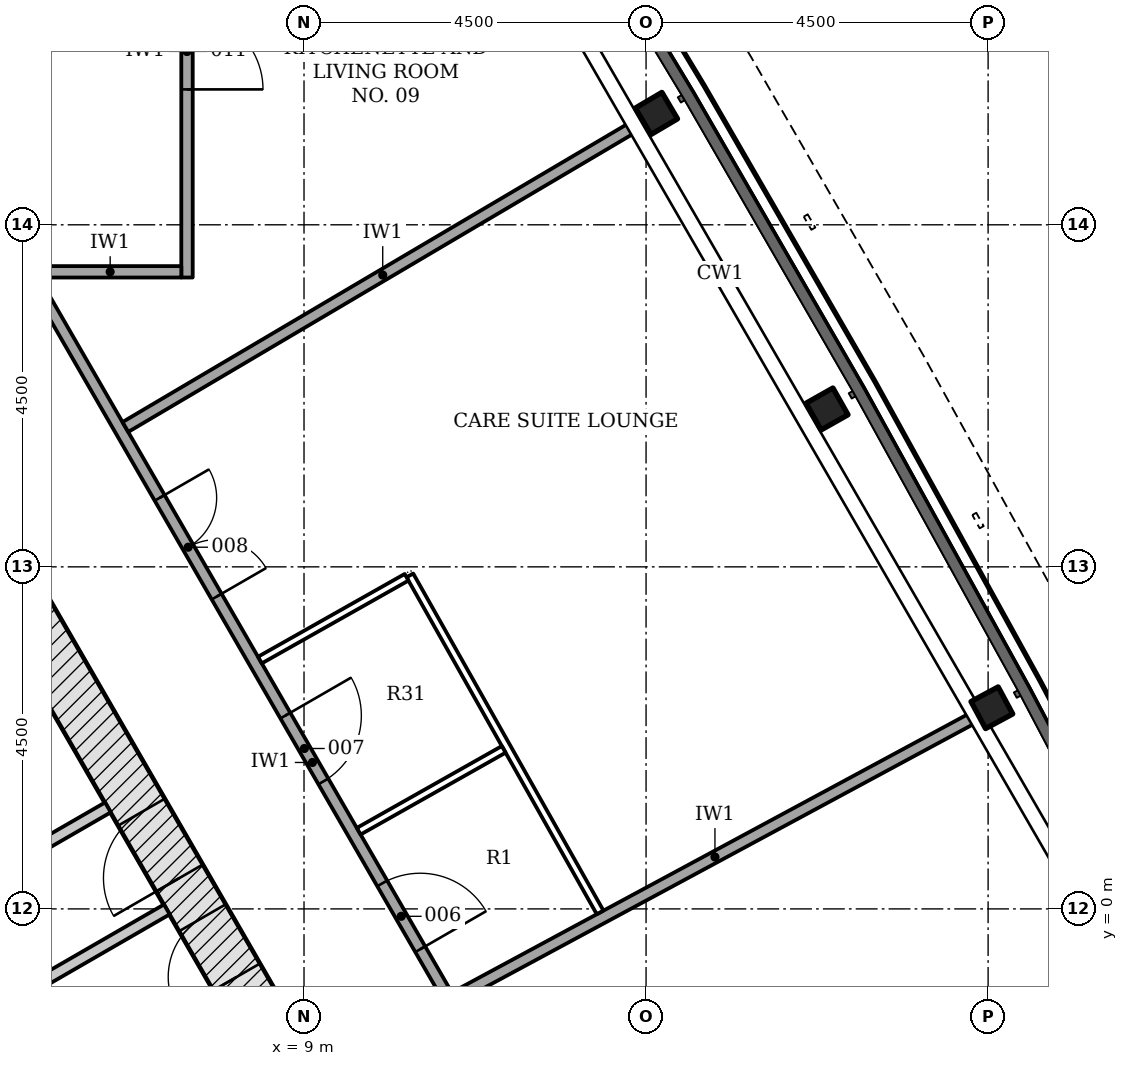
"""IFC4 building model, lengths in metres.
Left out: names, types, materials, properties, quantities, classifications, styles, units other than length and angle.
Written with IfcOpenShell. Run it as: python <this file> out.ifc"""

import sys

from ifc_helpers import new_model, si_unit, direction, frame, frame_2d, origin, origin_2d, place, context, subcontext, project, spatial, rectangle, i_section, extrude, element, fill, save


model = new_model("IFC4")
c1 = context("Model", 3, precision=1e-05, world=origin(), true_north=direction((0.0, 1.0)))
c2 = subcontext(c1, "Body", "Model", "MODEL_VIEW")
j1 = project(units=[si_unit("LENGTHUNIT", "METRE"), si_unit("PLANEANGLEUNIT", "RADIAN")], contexts=[c1])
p1 = place(None, origin())
s1 = spatial("IfcSite", under=j1, at=p1, CompositionType="ELEMENT")
p2 = place(p1, origin())
s2 = spatial("IfcBuilding", under=s1, at=p2, CompositionType="ELEMENT")
p3 = place(p2, frame((0.0, 0.0, 79.8)))
s3 = spatial("IfcBuildingStorey", under=s2, at=p3, CompositionType="ELEMENT", Elevation=79.8)
p4 = place(p3, frame((10.311, -4.703, -0.2), z_axis=(0.0, 0.0, 1.0), x_axis=(-0.500001446645, 0.866024568562, 0.0)))
e1 = element("IfcWall", 1, at=p4, inside=s3, PredefinedType="SHEAR", context=c2, shape_type="SweptSolid", body=[
    extrude(rectangle(XDim=18.458, YDim=0.7, at=frame_2d((9.229, 0.0))), origin(), (0.0, 0.0, 1.0), 3.6),
])
p5 = place(p4, frame((5.9, 0.0, 0.2)))
e2 = element("IfcOpeningElement", 2, at=p5, cuts=e1, PredefinedType="OPENING", context=c2, shape_type="SweptSolid", body=[
    extrude(rectangle(XDim=1.0, YDim=2.1, at=frame_2d((0.5, 1.05))), frame((0.0, 0.36, 0.0), z_axis=(0.0, -1.0, 0.0), x_axis=(1.0, 0.0, 0.0)), (0.0, 0.0, 1.0), 0.72),
])
p6 = place(p4, frame((1.452, 0.0, 0.2)))
e3 = element("IfcOpeningElement", 3, at=p6, cuts=e1, PredefinedType="OPENING", context=c2, shape_type="SweptSolid", body=[
    extrude(rectangle(XDim=0.9, YDim=2.1, at=frame_2d((0.45, 1.05))), frame((0.0, 0.36, 0.0), z_axis=(0.0, -1.0, 0.0), x_axis=(1.0, 0.0, 0.0)), (0.0, 0.0, 1.0), 0.72),
])
p7 = place(p4, frame((4.396, 0.0, 0.2)))
e4 = element("IfcOpeningElement", 4, at=p7, cuts=e1, PredefinedType="OPENING", context=c2, shape_type="SweptSolid", body=[
    extrude(rectangle(XDim=0.9, YDim=2.1, at=frame_2d((0.45, 1.05))), frame((0.0, 0.36, 0.0), z_axis=(0.0, -1.0, 0.0), x_axis=(1.0, 0.0, 0.0)), (0.0, 0.0, 1.0), 0.72),
])
p8 = place(p4, frame((13.023, 0.0, 0.2)))
e5 = element("IfcOpeningElement", 5, at=p8, cuts=e1, PredefinedType="OPENING", context=c2, shape_type="SweptSolid", body=[
    extrude(rectangle(XDim=0.9, YDim=2.1, at=frame_2d((0.45, 1.05))), frame((0.0, 0.36, 0.0), z_axis=(0.0, -1.0, 0.0), x_axis=(1.0, 0.0, 0.0)), (0.0, 0.0, 1.0), 0.72),
])
for number, where, z_axis, x_axis in (
    (6, (18.05, 2.646, -0.2), (0.0, 0.0, 1.0), (-0.474, 0.88, 0.0)),
    (7, (15.881, 6.577, -0.2), (0.0, 0.0, 1.0), (-0.492, 0.871, 0.0)),
    (8, (13.636, 10.465, -0.2), (0.0, 0.0, 1.0), (-0.508, 0.861, 0.0)),
):
    element("IfcColumn", number, at=place(p3, frame(where, z_axis=z_axis, x_axis=x_axis)), inside=s3, PredefinedType="COLUMN", context=c2, shape_type="SweptSolid", body=[
        extrude(i_section(OverallWidth=0.404, OverallDepth=0.406, WebThickness=0.027, FlangeThickness=0.044, FilletRadius=0.015, at=origin_2d()), origin(), (0.0, 0.0, 1.0), 3.6),
    ])
p9 = place(p3, frame((-1.804, -3.413, 0.0), z_axis=(0.0, 0.0, 1.0), x_axis=(0.866035761792, 0.499982058975, 0.0)))
e9 = element("IfcWall", 9, at=p9, inside=s3, PredefinedType="PARTITIONING", context=c2, shape_type="SweptSolid", body=[
    extrude(rectangle(XDim=9.497, YDim=0.15, at=frame_2d((4.749, 0.0))), origin(), (0.0, 0.0, 1.0), 3.4),
])
p10 = place(p9, frame((2.85, 0.0, 0.0)))
e10 = element("IfcOpeningElement", 10, at=p10, cuts=e9, PredefinedType="OPENING", context=c2, shape_type="SweptSolid", body=[
    extrude(rectangle(XDim=0.9, YDim=2.1, at=frame_2d((0.45, 1.05))), frame((0.0, 0.085, 0.0), z_axis=(0.0, -1.0, 0.0), x_axis=(1.0, 0.0, 0.0)), (0.0, 0.0, 1.0), 0.17),
])
p11 = place(p3, frame((1.296, -3.413, 0.0), z_axis=(0.0, 0.0, 1.0), x_axis=(0.866029230515, 0.49999337185, 0.0)))
e11 = element("IfcWall", 11, at=p11, inside=s3, PredefinedType="PARTITIONING", context=c2, shape_type="SweptSolid", body=[
    extrude(rectangle(XDim=6.812, YDim=0.15, at=frame_2d((3.406, 0.0))), origin(), (0.0, 0.0, 1.0), 3.4),
])
p12 = place(p11, frame((1.507, 0.0, 0.0)))
e12 = element("IfcOpeningElement", 12, at=p12, cuts=e11, PredefinedType="OPENING", context=c2, shape_type="SweptSolid", body=[
    extrude(rectangle(XDim=0.9, YDim=2.1, at=frame_2d((0.45, 1.05))), frame((0.0, 0.085, 0.0), z_axis=(0.0, -1.0, 0.0), x_axis=(1.0, 0.0, 0.0)), (0.0, 0.0, 1.0), 0.17),
])
p13 = place(p3, frame((5.346, 8.446, 0.0), z_axis=(0.0, 0.0, 1.0), x_axis=(0.500008781656, -0.866020333634, 0.0)))
e13 = element("IfcWall", 13, at=p13, inside=s3, PredefinedType="PARTITIONING", context=c2, shape_type="SweptSolid", body=[
    extrude(rectangle(XDim=15.057, YDim=0.15, at=frame_2d((7.528, 0.0))), origin(), (0.0, 0.0, 1.0), 2.778),
])
p14 = place(p13, frame((12.552, 0.0, 0.0)))
e14 = element("IfcOpeningElement", 14, at=p14, cuts=e13, PredefinedType="OPENING", context=c2, shape_type="SweptSolid", body=[
    extrude(rectangle(XDim=1.0, YDim=2.1, at=frame_2d((0.5, 1.05))), frame((0.0, 0.085, 0.0), z_axis=(0.0, -1.0, 0.0), x_axis=(1.0, 0.0, 0.0)), (0.0, 0.0, 1.0), 0.17),
])
p15 = place(p13, frame((9.365, 0.0, 0.0)))
e15 = element("IfcOpeningElement", 15, at=p15, cuts=e13, PredefinedType="OPENING", context=c2, shape_type="SweptSolid", body=[
    extrude(rectangle(XDim=1.0, YDim=2.1, at=frame_2d((0.5, 1.05))), frame((0.0, 0.085, 0.0), z_axis=(0.0, -1.0, 0.0), x_axis=(1.0, 0.0, 0.0)), (0.0, 0.0, 1.0), 0.17),
])
p16 = place(p13, frame((6.816, 0.0, 0.0)))
e16 = element("IfcOpeningElement", 16, at=p16, cuts=e13, PredefinedType="OPENING", context=c2, shape_type="SweptSolid", body=[
    extrude(rectangle(XDim=1.0, YDim=2.1, at=frame_2d((0.5, 1.05))), frame((0.0, 0.085, 0.0), z_axis=(0.0, -1.0, 0.0), x_axis=(1.0, 0.0, 0.0)), (0.0, 0.0, 1.0), 0.17),
])
p17 = place(p13, frame((3.509, 0.0, 0.0)))
e17 = element("IfcOpeningElement", 17, at=p17, cuts=e13, PredefinedType="OPENING", context=c2, shape_type="SweptSolid", body=[
    extrude(rectangle(XDim=1.5, YDim=2.1, at=frame_2d((0.75, 1.05))), frame((0.0, 0.085, 0.0), z_axis=(0.0, -1.0, 0.0), x_axis=(1.0, 0.0, 0.0)), (0.0, 0.0, 1.0), 0.17),
])
p18 = place(p3, frame((7.461, 14.256, 0.0), z_axis=(0.0, 0.0, 1.0), x_axis=(0.0, -1.0, 0.0)))
e18 = element("IfcWall", 18, at=p18, inside=s3, PredefinedType="PARTITIONING", context=c2, shape_type="SweptSolid", body=[
    extrude(rectangle(XDim=5.95, YDim=0.15, at=frame_2d((2.975, 0.0))), origin(), (0.0, 0.0, 1.0), 2.778),
])
p19 = place(p18, frame((2.475, 0.0, 0.0)))
e19 = element("IfcOpeningElement", 19, at=p19, cuts=e18, PredefinedType="OPENING", context=c2, shape_type="SweptSolid", body=[
    extrude(rectangle(XDim=1.0, YDim=2.1, at=frame_2d((0.5, 1.05))), frame((0.0, 0.085, 0.0), z_axis=(0.0, -1.0, 0.0), x_axis=(1.0, 0.0, 0.0)), (0.0, 0.0, 1.0), 0.17),
])
p20 = place(p3, frame((5.514, 8.381, 0.0), z_axis=(0.0, 0.0, 1.0), x_axis=(1.0, 0.0, 0.0)))
e20 = element("IfcWall", 20, at=p20, inside=s3, PredefinedType="PARTITIONING", context=c2, shape_type="SweptSolid", body=[
    extrude(rectangle(XDim=1.872, YDim=0.15, at=frame_2d((0.936, 0.0))), origin(), (0.0, 0.0, 1.0), 3.4),
])
p21 = place(p3, frame((13.421, 10.338, 0.0), z_axis=(0.0, 0.0, 1.0), x_axis=(-0.861114991514, -0.508410239266, 0.0)))
e21 = element("IfcWall", 21, at=p21, inside=s3, PredefinedType="PARTITIONING", context=c2, shape_type="SweptSolid", body=[
    extrude(rectangle(XDim=7.863, YDim=0.15, at=frame_2d((3.932, 0.0))), origin(), (0.0, 0.0, 1.0), 2.778),
])
p22 = place(p3, frame((17.829, 2.528, 0.0), z_axis=(0.0, 0.0, 1.0), x_axis=(-0.880268417521, -0.474476040612, 0.0)))
e22 = element("IfcWall", 22, at=p22, inside=s3, PredefinedType="PARTITIONING", context=c2, shape_type="SweptSolid", body=[
    extrude(rectangle(XDim=7.777, YDim=0.15, at=frame_2d((3.889, 0.0))), origin(), (0.0, 0.0, 1.0), 2.778),
])
p23 = place(p3, frame((12.895, -0.046, 0.0), z_axis=(0.0, 0.0, 1.0), x_axis=(-0.491519870282, 0.870866360079, 0.0)))
e23 = element("IfcWall", 23, at=p23, inside=s3, PredefinedType="PARTITIONING", context=c2, shape_type="SweptSolid", body=[
    extrude(rectangle(XDim=5.091, YDim=0.1, at=frame_2d((2.545, 0.0))), origin(), (0.0, 0.0, 1.0), 2.778),
])
p24 = place(p3, frame((10.349, 4.363, 0.0), z_axis=(0.0, 0.0, 1.0), x_axis=(-0.870794636378, -0.491646927435, 0.0)))
e24 = element("IfcWall", 24, at=p24, inside=s3, PredefinedType="PARTITIONING", context=c2, shape_type="SweptSolid", body=[
    extrude(rectangle(XDim=2.216, YDim=0.1, at=frame_2d((1.108, 0.0))), origin(), (0.0, 0.0, 1.0), 3.4),
])
p25 = place(p3, frame((11.627, 2.099, 0.0), z_axis=(0.0, 0.0, 1.0), x_axis=(-0.870851244214, -0.491546651348, 0.0)))
e25 = element("IfcWall", 25, at=p25, inside=s3, PredefinedType="PARTITIONING", context=c2, shape_type="SweptSolid", body=[
    extrude(rectangle(XDim=2.19, YDim=0.1, at=frame_2d((1.095, 0.0))), origin(), (0.0, 0.0, 1.0), 3.4),
])
p26 = place(p5, origin())
e26 = element("IfcDoor", 26, at=p26, inside=s3, OperationType="SINGLE_SWING_LEFT", PredefinedType="DOOR", context=c2, shape_type="SweptSolid", body=[
    extrude(rectangle(XDim=1.0, YDim=2.1, at=frame_2d((0.5, 1.05))), frame((0.0, 0.075, 0.0), z_axis=(0.0, -1.0, 0.0), x_axis=(1.0, 0.0, 0.0)), (0.0, 0.0, 1.0), 0.15),
])
fill(e2, e26)
p27 = place(p7, origin())
e27 = element("IfcDoor", 27, at=p27, inside=s3, OperationType="SINGLE_SWING_LEFT", PredefinedType="DOOR", context=c2, shape_type="SweptSolid", body=[
    extrude(rectangle(XDim=0.9, YDim=2.1, at=frame_2d((0.45, 1.05))), frame((0.0, 0.075, 0.0), z_axis=(0.0, -1.0, 0.0), x_axis=(1.0, 0.0, 0.0)), (0.0, 0.0, 1.0), 0.15),
])
fill(e4, e27)
p28 = place(p15, origin())
e28 = element("IfcDoor", 28, at=p28, inside=s3, OperationType="SINGLE_SWING_RIGHT", PredefinedType="DOOR", context=c2, shape_type="SweptSolid", body=[
    extrude(rectangle(XDim=1.0, YDim=2.1, at=frame_2d((0.5, 1.05))), frame((0.0, 0.025, 0.0), z_axis=(0.0, -1.0, 0.0), x_axis=(1.0, 0.0, 0.0)), (0.0, 0.0, 1.0), 0.05),
])
fill(e15, e28)
p29 = place(p16, origin())
e29 = element("IfcDoor", 29, at=p29, inside=s3, OperationType="SINGLE_SWING_LEFT", PredefinedType="DOOR", context=c2, shape_type="SweptSolid", body=[
    extrude(rectangle(XDim=1.0, YDim=2.1, at=frame_2d((0.5, 1.05))), frame((0.0, 0.025, 0.0), z_axis=(0.0, -1.0, 0.0), x_axis=(1.0, 0.0, 0.0)), (0.0, 0.0, 1.0), 0.05),
])
fill(e16, e29)
p30 = place(p17, origin())
e30 = element("IfcDoor", 30, at=p30, inside=s3, OperationType="DOUBLE_DOOR_SINGLE_SWING", PredefinedType="DOOR", context=c2, shape_type="SweptSolid", body=[
    extrude(rectangle(XDim=1.5, YDim=2.1, at=frame_2d((0.75, 1.05))), frame((0.0, 0.025, 0.0), z_axis=(0.0, -1.0, 0.0), x_axis=(1.0, 0.0, 0.0)), (0.0, 0.0, 1.0), 0.05),
])
fill(e17, e30)
p31 = place(p19, origin())
e31 = element("IfcDoor", 31, at=p31, inside=s3, OperationType="SINGLE_SWING_RIGHT", PredefinedType="DOOR", context=c2, shape_type="SweptSolid", body=[
    extrude(rectangle(XDim=1.0, YDim=2.1, at=frame_2d((0.5, 1.05))), frame((0.0, 0.025, 0.0), z_axis=(0.0, -1.0, 0.0), x_axis=(1.0, 0.0, 0.0)), (0.0, 0.0, 1.0), 0.05),
])
fill(e19, e31)
save(model, sys.argv[1])
